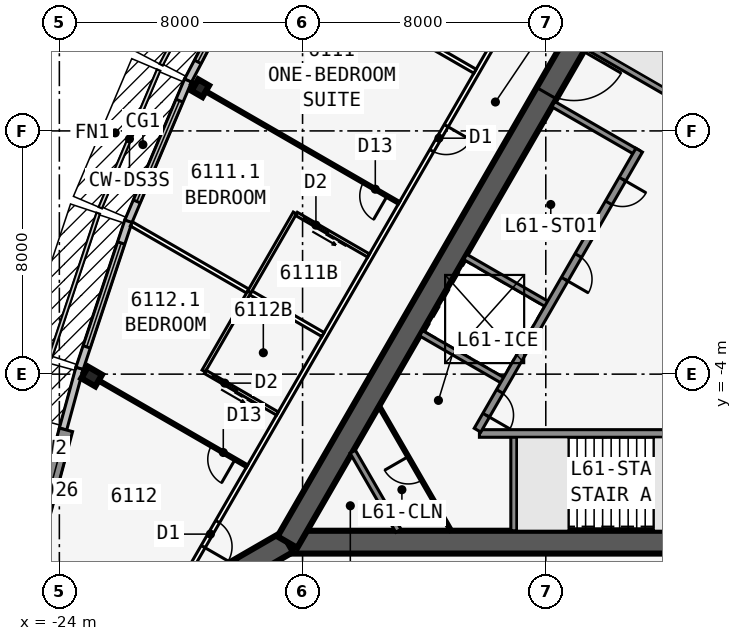
"""IFC4 building model, lengths in metres.
Left out: names, types, materials, properties, quantities, classifications, styles, units other than length and angle.
Written with IfcOpenShell. Run it as: python <this file> out.ifc"""

import sys

from ifc_helpers import new_model, si_unit, direction, frame, frame_2d, origin, origin_2d, place, context, subcontext, project, spatial, polyline, rectangle, i_section, outline, extrude, element, fill, save


model = new_model("IFC4")
c1 = context("Model", 3, precision=1e-05, world=origin(), true_north=direction((0.0, 1.0)))
c2 = subcontext(c1, "Body", "Model", "MODEL_VIEW")
j1 = project(units=[si_unit("LENGTHUNIT", "METRE"), si_unit("PLANEANGLEUNIT", "RADIAN")], contexts=[c1])
p1 = place(None, origin())
s1 = spatial("IfcSite", under=j1, at=p1, CompositionType="ELEMENT")
p2 = place(p1, origin())
s2 = spatial("IfcBuilding", under=s1, at=p2, CompositionType="ELEMENT")
p3 = place(p2, frame((0.0, 0.0, 229.7)))
s3 = spatial("IfcBuildingStorey", under=s2, at=p3, CompositionType="ELEMENT", Elevation=229.7)
p4 = place(p3, frame((-16.5, -9.526, 0.0), z_axis=(0.0, 0.0, 1.0), x_axis=(1.0, 0.0, 0.0)))
e1 = element("IfcWall", 1, at=p4, inside=s3, PredefinedType="SHEAR", context=c2, shape_type="SweptSolid", body=[
    extrude(rectangle(XDim=33.0, YDim=0.75, at=frame_2d((16.5, 0.0))), origin(), (0.0, 0.0, 1.0), 3.6),
])
p5 = place(p4, frame((14.05, 0.0, 0.0)))
e2 = element("IfcOpeningElement", 2, at=p5, cuts=e1, PredefinedType="OPENING", context=c2, shape_type="SweptSolid", body=[
    extrude(rectangle(XDim=1.8, YDim=2.13, at=frame_2d((0.9, 1.065))), frame((0.0, 0.385, 0.0), z_axis=(0.0, -1.0, 0.0), x_axis=(1.0, 0.0, 0.0)), (0.0, 0.0, 1.0), 0.77),
])
p6 = place(p3, frame((-10.183, -5.951, 0.0), z_axis=(0.0, 0.0, 1.0), x_axis=(1.0, 0.0, 0.0)))
e3 = element("IfcWall", 3, at=p6, inside=s3, PredefinedType="SOLIDWALL", context=c2, shape_type="SweptSolid", body=[
    extrude(rectangle(XDim=7.633, YDim=0.25, at=frame_2d((3.816, 0.0))), origin(), (0.0, 0.0, 1.0), 3.35),
])
p7 = place(p3, frame((-9.05, -5.951, 0.0), z_axis=(0.0, 0.0, 1.0), x_axis=(0.0, -1.0, 0.0)))
e4 = element("IfcWall", 4, at=p7, inside=s3, PredefinedType="SOLIDWALL", context=c2, shape_type="SweptSolid", body=[
    extrude(rectangle(XDim=3.2, YDim=0.2, at=frame_2d((1.6, 0.0))), origin(), (0.0, 0.0, 1.0), 3.35),
])
p8 = place(p3, frame((0.0, 19.052, 0.0), z_axis=(0.0, 0.0, 1.0), x_axis=(-0.499999749417, -0.866025548458, 0.0)))
e5 = element("IfcWall", 5, at=p8, inside=s3, PredefinedType="SHEAR", context=c2, shape_type="SweptSolid", body=[
    extrude(rectangle(XDim=33.0, YDim=0.75, at=frame_2d((16.5, 0.0))), origin(), (0.0, 0.0, 1.0), 3.6),
])
p9 = place(p8, frame((14.15, 0.0, 0.0)))
e6 = element("IfcOpeningElement", 6, at=p9, cuts=e5, PredefinedType="OPENING", context=c2, shape_type="SweptSolid", body=[
    extrude(rectangle(XDim=1.8, YDim=2.13, at=frame_2d((0.9, 1.065))), frame((0.0, 0.385, 0.0), z_axis=(0.0, -1.0, 0.0), x_axis=(1.0, 0.0, 0.0)), (0.0, 0.0, 1.0), 0.77),
])
p10 = place(p8, frame((12.6, 0.0, 0.0)))
e7 = element("IfcOpeningElement", 7, at=p10, cuts=e5, PredefinedType="OPENING", context=c2, shape_type="SweptSolid", body=[
    extrude(rectangle(XDim=1.0, YDim=2.13, at=frame_2d((0.5, 1.065))), frame((0.0, 0.385, 0.0), z_axis=(0.0, -1.0, 0.0), x_axis=(1.0, 0.0, 0.0)), (0.0, 0.0, 1.0), 0.77),
])
p11 = place(p3, frame((-4.929, 3.365, 0.0), z_axis=(0.0, 0.0, 1.0), x_axis=(-0.499991433582, -0.866030349552, 0.0)))
e8 = element("IfcWall", 8, at=p11, inside=s3, PredefinedType="SOLIDWALL", context=c2, shape_type="SweptSolid", body=[
    extrude(rectangle(XDim=10.633, YDim=0.25, at=frame_2d((5.316, 0.0))), origin(), (0.0, 0.0, 1.0), 3.35),
])
p12 = place(p11, frame((9.164, 0.0, 0.0)))
e9 = element("IfcOpeningElement", 9, at=p12, cuts=e8, PredefinedType="OPENING", context=c2, shape_type="SweptSolid", body=[
    extrude(rectangle(XDim=0.9, YDim=2.13, at=frame_2d((0.45, 1.065))), frame((0.0, 0.135, 0.0), z_axis=(0.0, -1.0, 0.0), x_axis=(1.0, 0.0, 0.0)), (0.0, 0.0, 1.0), 0.27),
])
p13 = place(p11, frame((1.1, 0.0, 0.0)))
e10 = element("IfcOpeningElement", 10, at=p13, cuts=e8, PredefinedType="OPENING", context=c2, shape_type="SweptSolid", body=[
    extrude(rectangle(XDim=0.9, YDim=2.13, at=frame_2d((0.45, 1.065))), frame((0.0, 0.135, 0.0), z_axis=(0.0, -1.0, 0.0), x_axis=(1.0, 0.0, 0.0)), (0.0, 0.0, 1.0), 0.27),
])
p14 = place(p11, frame((4.0, 0.0, 0.0)))
e11 = element("IfcOpeningElement", 11, at=p14, cuts=e8, PredefinedType="OPENING", context=c2, shape_type="SweptSolid", body=[
    extrude(rectangle(XDim=0.9, YDim=2.13, at=frame_2d((0.45, 1.065))), frame((0.0, 0.135, 0.0), z_axis=(0.0, -1.0, 0.0), x_axis=(1.0, 0.0, 0.0)), (0.0, 0.0, 1.0), 0.27),
])
for number, where, z_axis, x_axis in (
    (12, (-3.879, 5.184, 0.0), (0.0, 0.0, 1.0), (-0.866, 0.5, 0.0)),
    (13, (-4.979, 3.279, 0.0), (0.0, 0.0, 1.0), (-0.866, 0.5, 0.0)),
    (14, (-7.879, -1.744, 0.0), (0.0, 0.0, 1.0), (-0.866, 0.5, 0.0)),
):
    element("IfcWall", number, at=place(p3, frame(where, z_axis=z_axis, x_axis=x_axis)), inside=s3, PredefinedType="SOLIDWALL", context=c2, shape_type="SweptSolid", body=[
        extrude(rectangle(XDim=3.2, YDim=0.2, at=frame_2d((1.6, 0.0))), origin(), (0.0, 0.0, 1.0), 3.35),
    ])
p15 = place(p3, frame((-9.329, -4.256, 0.0), z_axis=(0.0, 0.0, 1.0), x_axis=(-0.866022944154, 0.50000426018, 0.0)))
e15 = element("IfcWall", 15, at=p15, inside=s3, PredefinedType="SOLIDWALL", context=c2, shape_type="SweptSolid", body=[
    extrude(rectangle(XDim=3.2, YDim=0.2, at=frame_2d((1.6, 0.0))), origin(), (0.0, 0.0, 1.0), 3.35),
])
p16 = place(p3, frame((-16.5, -9.526, 0.0), z_axis=(0.0, 0.0, 1.0), x_axis=(-0.866031398331, -0.499989616998, 0.0)))
e16 = element("IfcWall", 16, at=p16, inside=s3, PredefinedType="SHEAR", context=c2, shape_type="SweptSolid", body=[
    extrude(rectangle(XDim=4.746, YDim=0.75, at=frame_2d((2.373, 0.0))), origin(), (0.0, 0.0, 1.0), 3.6),
])
p17 = place(p16, frame((1.725, 0.0, 0.0)))
e17 = element("IfcOpeningElement", 17, at=p17, cuts=e16, PredefinedType="OPENING", context=c2, shape_type="SweptSolid", body=[
    extrude(rectangle(XDim=1.8, YDim=2.13, at=frame_2d((0.9, 1.065))), frame((0.0, 0.385, 0.0), z_axis=(0.0, -1.0, 0.0), x_axis=(1.0, 0.0, 0.0)), (0.0, 0.0, 1.0), 0.77),
])
p18 = place(p3, frame((-19.363, 5.406, 0.0), z_axis=(0.0, 0.0, 1.0), x_axis=(-0.866025403784, 0.5, 0.0)))
e18 = element("IfcColumn", 18, at=p18, inside=s3, PredefinedType="COLUMN", context=c2, shape_type="SweptSolid", body=[
    extrude(i_section(OverallWidth=0.411, OverallDepth=0.434, WebThickness=0.036, FlangeThickness=0.057, at=origin_2d()), origin(), (0.0, 0.0, 1.0), 3.6),
])
p19 = place(p3, frame((-22.937, -4.078, 0.0), z_axis=(0.0, 0.0, 1.0), x_axis=(-0.5, -0.866025403784, 0.0)))
e19 = element("IfcColumn", 19, at=p19, inside=s3, PredefinedType="COLUMN", context=c2, shape_type="SweptSolid", body=[
    extrude(i_section(OverallWidth=0.442, OverallDepth=0.531, WebThickness=0.066, FlangeThickness=0.106, at=origin_2d()), origin(), (0.0, 0.0, 1.0), 3.6),
])
p20 = place(p3, frame((-17.45, 10.081, 0.0), z_axis=(0.0, 0.0, 1.0), x_axis=(-0.463976002579, -0.885847768542, 0.0)))
e20 = element("IfcWall", 20, at=p20, inside=s3, PredefinedType="STANDARD", context=c2, shape_type="SweptSolid", body=[
    extrude(rectangle(XDim=5.004, YDim=0.25, at=frame_2d((2.502, 0.0))), origin(), (0.0, 0.0, 1.0), 3.35),
])
p21 = place(p20, frame((0.702, 0.0, 0.45)))
e21 = element("IfcOpeningElement", 21, at=p21, cuts=e20, PredefinedType="OPENING", context=c2, shape_type="SweptSolid", body=[
    extrude(rectangle(XDim=3.6, YDim=2.6, at=frame_2d((1.8, 1.3))), frame((0.0, 0.135, 0.0), z_axis=(0.0, -1.0, 0.0), x_axis=(1.0, 0.0, 0.0)), (0.0, 0.0, 1.0), 0.27),
])
p22 = place(p3, frame((-19.768, 5.657, 0.0), z_axis=(0.0, 0.0, 1.0), x_axis=(-0.390096809471, -0.920773848044, 0.0)))
e22 = element("IfcWall", 22, at=p22, inside=s3, PredefinedType="STANDARD", context=c2, shape_type="SweptSolid", body=[
    extrude(rectangle(XDim=5.038, YDim=0.25, at=frame_2d((2.519, 0.0))), origin(), (0.0, 0.0, 1.0), 3.35),
])
p23 = place(p22, frame((0.719, 0.0, 0.45)))
e23 = element("IfcOpeningElement", 23, at=p23, cuts=e22, PredefinedType="OPENING", context=c2, shape_type="SweptSolid", body=[
    extrude(rectangle(XDim=3.6, YDim=2.6, at=frame_2d((1.8, 1.3))), frame((0.0, 0.135, 0.0), z_axis=(0.0, -1.0, 0.0), x_axis=(1.0, 0.0, 0.0)), (0.0, 0.0, 1.0), 0.27),
])
p24 = place(p3, frame((-21.729, 1.028, 0.0), z_axis=(0.0, 0.0, 1.0), x_axis=(-0.315108478109, -0.949055660656, 0.0)))
e24 = element("IfcWall", 24, at=p24, inside=s3, PredefinedType="STANDARD", context=c2, shape_type="SweptSolid", body=[
    extrude(rectangle(XDim=5.105, YDim=0.25, at=frame_2d((2.552, 0.0))), origin(), (0.0, 0.0, 1.0), 3.35),
])
p25 = place(p24, frame((0.752, 0.0, 0.45)))
e25 = element("IfcOpeningElement", 25, at=p25, cuts=e24, PredefinedType="OPENING", context=c2, shape_type="SweptSolid", body=[
    extrude(rectangle(XDim=3.6, YDim=2.6, at=frame_2d((1.8, 1.3))), frame((0.0, 0.135, 0.0), z_axis=(0.0, -1.0, 0.0), x_axis=(1.0, 0.0, 0.0)), (0.0, 0.0, 1.0), 0.27),
])
p26 = place(p3, frame((-23.336, -3.811, 0.0), z_axis=(0.0, 0.0, 1.0), x_axis=(-0.262867703986, -0.964831887015, 0.0)))
e26 = element("IfcWall", 26, at=p26, inside=s3, PredefinedType="STANDARD", context=c2, shape_type="SweptSolid", body=[
    extrude(rectangle(XDim=2.068, YDim=0.25, at=frame_2d((1.034, 0.0))), origin(), (0.0, 0.0, 1.0), 3.35),
])
p27 = place(p3, frame((-23.783, -5.832, 0.0), z_axis=(0.0, 0.0, 1.0), x_axis=(-0.258784695888, -0.965935029479, 0.0)))
e27 = element("IfcWall", 27, at=p27, inside=s3, PredefinedType="SOLIDWALL", context=c2, shape_type="SweptSolid", body=[
    extrude(rectangle(XDim=4.184, YDim=0.45, at=frame_2d((2.092, 0.0))), origin(), (0.0, 0.0, 1.0), 3.35),
])
p28 = place(p27, frame((0.592, 0.0, 0.45)))
e28 = element("IfcOpeningElement", 28, at=p28, cuts=e27, PredefinedType="OPENING", context=c2, shape_type="SweptSolid", body=[
    extrude(rectangle(XDim=3.0, YDim=2.6, at=frame_2d((1.5, 1.3))), frame((0.0, 0.235, 0.0), z_axis=(0.0, -1.0, 0.0), x_axis=(1.0, 0.0, 0.0)), (0.0, 0.0, 1.0), 0.47),
])
p29 = place(p3, frame((-24.865, -9.757, 0.0), z_axis=(0.0, 0.0, 1.0), x_axis=(0.258799282522, -0.96593112144, 0.0)))
e29 = element("IfcWall", 29, at=p29, inside=s3, PredefinedType="SOLIDWALL", context=c2, shape_type="SweptSolid", body=[
    extrude(outline(polyline([(4.184, 0.225), (4.125, 0.225), (3.705, 0.113), (3.675, 0.225), (0.0, 0.225), (0.0, -0.225), (4.184, -0.225), (4.184, 0.225)])), origin(), (0.0, 0.0, 1.0), 3.35),
])
p30 = place(p29, frame((0.713, 0.0, 0.45)))
e30 = element("IfcOpeningElement", 30, at=p30, cuts=e29, PredefinedType="OPENING", context=c2, shape_type="SweptSolid", body=[
    extrude(rectangle(XDim=2.4, YDim=2.6, at=frame_2d((1.2, 1.3))), frame((0.0, 0.235, 0.0), z_axis=(0.0, -1.0, 0.0), x_axis=(1.0, 0.0, 0.0)), (0.0, 0.0, 1.0), 0.47),
])
p31 = place(p3, frame((-0.425, 22.966, 0.0), z_axis=(0.0, 0.0, 1.0), x_axis=(-0.500000265775, -0.866025250339, 0.0)))
e31 = element("IfcWall", 31, at=p31, inside=s3, PredefinedType="PARTITIONING", context=c2, shape_type="SweptSolid", body=[
    extrude(rectangle(XDim=39.354, YDim=0.15, at=frame_2d((19.677, 0.0))), origin(), (0.0, 0.0, 1.0), 3.35),
])
p32 = place(p31, frame((1.665, 0.0, 0.0)))
e32 = element("IfcOpeningElement", 32, at=p32, cuts=e31, PredefinedType="OPENING", context=c2, shape_type="SweptSolid", body=[
    extrude(rectangle(XDim=0.95, YDim=2.13, at=frame_2d((0.475, 1.065))), frame((0.0, 0.085, 0.0), z_axis=(0.0, -1.0, 0.0), x_axis=(1.0, 0.0, 0.0)), (0.0, 0.0, 1.0), 0.17),
])
p33 = place(p31, frame((11.702, 0.0, 0.0)))
e33 = element("IfcOpeningElement", 33, at=p33, cuts=e31, PredefinedType="OPENING", context=c2, shape_type="SweptSolid", body=[
    extrude(rectangle(XDim=0.95, YDim=2.13, at=frame_2d((0.475, 1.065))), frame((0.0, 0.085, 0.0), z_axis=(0.0, -1.0, 0.0), x_axis=(1.0, 0.0, 0.0)), (0.0, 0.0, 1.0), 0.17),
])
p34 = place(p31, frame((21.702, 0.0, 0.0)))
e34 = element("IfcOpeningElement", 34, at=p34, cuts=e31, PredefinedType="OPENING", context=c2, shape_type="SweptSolid", body=[
    extrude(rectangle(XDim=0.95, YDim=2.13, at=frame_2d((0.475, 1.065))), frame((0.0, 0.085, 0.0), z_axis=(0.0, -1.0, 0.0), x_axis=(1.0, 0.0, 0.0)), (0.0, 0.0, 1.0), 0.17),
])
p35 = place(p31, frame((36.739, 0.0, 0.0)))
e35 = element("IfcOpeningElement", 35, at=p35, cuts=e31, PredefinedType="OPENING", context=c2, shape_type="SweptSolid", body=[
    extrude(rectangle(XDim=0.95, YDim=2.13, at=frame_2d((0.475, 1.065))), frame((0.0, 0.085, 0.0), z_axis=(0.0, -1.0, 0.0), x_axis=(1.0, 0.0, 0.0)), (0.0, 0.0, 1.0), 0.17),
])
p36 = place(p3, frame((-10.329, 5.963, 0.0), z_axis=(0.0, 0.0, 1.0), x_axis=(-0.866016460812, 0.500015489362, 0.0)))
e36 = element("IfcWall", 36, at=p36, inside=s3, PredefinedType="PARTITIONING", context=c2, shape_type="SweptSolid", body=[
    extrude(rectangle(XDim=8.101, YDim=0.15, at=frame_2d((4.051, 0.0))), origin(), (0.0, 0.0, 1.0), 2.309),
])
p37 = place(p3, frame((-12.829, 1.633, 0.0), z_axis=(0.0, 0.0, 1.0), x_axis=(-0.866030558329, 0.49999107196, 0.0)))
e37 = element("IfcWall", 37, at=p37, inside=s3, PredefinedType="PARTITIONING", context=c2, shape_type="SweptSolid", body=[
    extrude(rectangle(XDim=7.894, YDim=0.1, at=frame_2d((3.947, 0.0))), origin(), (0.0, 0.0, 1.0), 2.25),
])
p38 = place(p37, frame((0.45, 0.0, 0.0)))
e38 = element("IfcOpeningElement", 38, at=p38, cuts=e37, PredefinedType="OPENING", context=c2, shape_type="SweptSolid", body=[
    extrude(rectangle(XDim=0.9, YDim=2.13, at=frame_2d((0.45, 1.065))), frame((0.0, 0.06, 0.0), z_axis=(0.0, -1.0, 0.0), x_axis=(1.0, 0.0, 0.0)), (0.0, 0.0, 1.0), 0.12),
])
p39 = place(p3, frame((-15.329, -2.697, 0.0), z_axis=(0.0, 0.0, 1.0), x_axis=(-0.866032413668, 0.499987858329, 0.0)))
e39 = element("IfcWall", 39, at=p39, inside=s3, PredefinedType="PARTITIONING", context=c2, shape_type="SweptSolid", body=[
    extrude(rectangle(XDim=7.273, YDim=0.15, at=frame_2d((3.636, 0.0))), origin(), (0.0, 0.0, 1.0), 2.309),
])
p40 = place(p3, frame((-17.829, -7.027, 0.0), z_axis=(0.0, 0.0, 1.0), x_axis=(-0.866026604282, 0.499997920671, 0.0)))
e40 = element("IfcWall", 40, at=p40, inside=s3, PredefinedType="PARTITIONING", context=c2, shape_type="SweptSolid", body=[
    extrude(rectangle(XDim=6.24, YDim=0.1, at=frame_2d((3.12, 0.0))), origin(), (0.0, 0.0, 1.0), 2.25),
])
p41 = place(p40, frame((0.45, 0.0, 0.0)))
e41 = element("IfcOpeningElement", 41, at=p41, cuts=e40, PredefinedType="OPENING", context=c2, shape_type="SweptSolid", body=[
    extrude(rectangle(XDim=0.9, YDim=2.13, at=frame_2d((0.45, 1.065))), frame((0.0, 0.06, 0.0), z_axis=(0.0, -1.0, 0.0), x_axis=(1.0, 0.0, 0.0)), (0.0, 0.0, 1.0), 0.12),
])
p42 = place(p3, frame((-16.253, 1.301, 0.0), z_axis=(0.0, 0.0, 1.0), x_axis=(-0.499990139034, -0.866031096941, 0.0)))
e42 = element("IfcWall", 42, at=p42, inside=s3, PredefinedType="PLUMBINGWALL", context=c2, shape_type="SweptSolid", body=[
    extrude(rectangle(XDim=3.0, YDim=0.12, at=frame_2d((1.5, 0.0))), origin(), (0.0, 0.0, 1.0), 3.35),
])
p43 = place(p3, frame((-13.829, -0.099, 0.0), z_axis=(0.0, 0.0, 1.0), x_axis=(-0.865997131366, 0.500048966069, 0.0)))
e43 = element("IfcWall", 43, at=p43, inside=s3, PredefinedType="PLUMBINGWALL", context=c2, shape_type="SweptSolid", body=[
    extrude(rectangle(XDim=2.74, YDim=0.12, at=frame_2d((1.37, 0.0))), origin(), (0.0, 0.0, 1.0), 3.35),
])
p44 = place(p43, frame((1.55, 0.0, 0.0)))
e44 = element("IfcOpeningElement", 44, at=p44, cuts=e43, PredefinedType="OPENING", context=c2, shape_type="SweptSolid", body=[
    extrude(rectangle(XDim=0.9, YDim=2.13, at=frame_2d((0.45, 1.065))), frame((0.0, 0.07, 0.0), z_axis=(0.0, -1.0, 0.0), x_axis=(1.0, 0.0, 0.0)), (0.0, 0.0, 1.0), 0.14),
])
p45 = place(p3, frame((-17.753, -1.297, 0.0), z_axis=(0.0, 0.0, 1.0), x_axis=(-0.499990139034, -0.866031096941, 0.0)))
e45 = element("IfcWall", 45, at=p45, inside=s3, PredefinedType="PLUMBINGWALL", context=c2, shape_type="SweptSolid", body=[
    extrude(rectangle(XDim=3.0, YDim=0.12, at=frame_2d((1.5, 0.0))), origin(), (0.0, 0.0, 1.0), 3.35),
])
p46 = place(p3, frame((-16.829, -5.295, 0.0), z_axis=(0.0, 0.0, 1.0), x_axis=(-0.866035715982, 0.499982138324, 0.0)))
e46 = element("IfcWall", 46, at=p46, inside=s3, PredefinedType="PLUMBINGWALL", context=c2, shape_type="SweptSolid", body=[
    extrude(rectangle(XDim=2.74, YDim=0.12, at=frame_2d((1.37, 0.0))), origin(), (0.0, 0.0, 1.0), 3.35),
])
p47 = place(p46, frame((1.55, 0.0, 0.0)))
e47 = element("IfcOpeningElement", 47, at=p47, cuts=e46, PredefinedType="OPENING", context=c2, shape_type="SweptSolid", body=[
    extrude(rectangle(XDim=0.9, YDim=2.13, at=frame_2d((0.45, 1.065))), frame((0.0, 0.07, 0.0), z_axis=(0.0, -1.0, 0.0), x_axis=(1.0, 0.0, 0.0)), (0.0, 0.0, 1.0), 0.14),
])
p48 = place(p3, frame((-12.848, -9.151, 0.0), z_axis=(0.0, 0.0, 1.0), x_axis=(-0.499952404951, 0.866052881055, 0.0)))
e48 = element("IfcWall", 48, at=p48, inside=s3, PredefinedType="SOLIDWALL", context=c2, shape_type="SweptSolid", body=[
    extrude(rectangle(XDim=3.002, YDim=0.2, at=frame_2d((1.501, 0.0))), origin(), (0.0, 0.0, 1.0), 3.35),
])
p49 = place(p3, frame((-11.116, -9.151, 0.0), z_axis=(0.0, 0.0, 1.0), x_axis=(-0.499999210213, 0.866025859768, 0.0)))
e49 = element("IfcWall", 49, at=p49, inside=s3, PredefinedType="PARTITIONING", context=c2, shape_type="SweptSolid", body=[
    extrude(rectangle(XDim=4.734, YDim=0.1, at=frame_2d((2.367, 0.0))), origin(), (0.0, 0.0, 1.0), 3.35),
])
p50 = place(p49, frame((1.917, 0.0, 0.0)))
e50 = element("IfcOpeningElement", 50, at=p50, cuts=e49, PredefinedType="OPENING", context=c2, shape_type="SweptSolid", body=[
    extrude(rectangle(XDim=0.9, YDim=2.13, at=frame_2d((0.45, 1.065))), frame((0.0, 0.06, 0.0), z_axis=(0.0, -1.0, 0.0), x_axis=(1.0, 0.0, 0.0)), (0.0, 0.0, 1.0), 0.12),
])
p51 = place(p3, frame((-7.247, -7.576, 0.0), z_axis=(0.0, 0.0, 1.0), x_axis=(1.0, 0.0, 0.0)))
e51 = element("IfcWall", 51, at=p51, inside=s3, PredefinedType="SOLIDWALL", context=c2, shape_type="SweptSolid", body=[
    extrude(rectangle(XDim=2.794, YDim=0.1, at=frame_2d((1.397, 0.0))), origin(), (0.0, 0.0, 1.0), 3.6),
])
p52 = place(p21, origin())
e52 = element("IfcWindow", 52, at=p52, inside=s3, PartitioningType="SINGLE_PANEL", PredefinedType="WINDOW", context=c2, shape_type="SweptSolid", body=[
    extrude(rectangle(XDim=3.6, YDim=2.6, at=frame_2d((1.8, 1.3))), frame((0.0, 0.03, 0.0), z_axis=(0.0, -1.0, 0.0), x_axis=(1.0, 0.0, 0.0)), (0.0, 0.0, 1.0), 0.06),
])
fill(e21, e52)
p53 = place(p23, origin())
e53 = element("IfcWindow", 53, at=p53, inside=s3, PartitioningType="SINGLE_PANEL", PredefinedType="WINDOW", context=c2, shape_type="SweptSolid", body=[
    extrude(rectangle(XDim=3.6, YDim=2.6, at=frame_2d((1.8, 1.3))), frame((0.0, 0.03, 0.0), z_axis=(0.0, -1.0, 0.0), x_axis=(1.0, 0.0, 0.0)), (0.0, 0.0, 1.0), 0.06),
])
fill(e23, e53)
p54 = place(p25, origin())
e54 = element("IfcWindow", 54, at=p54, inside=s3, PartitioningType="SINGLE_PANEL", PredefinedType="WINDOW", context=c2, shape_type="SweptSolid", body=[
    extrude(rectangle(XDim=3.6, YDim=2.6, at=frame_2d((1.8, 1.3))), frame((0.0, 0.03, 0.0), z_axis=(0.0, -1.0, 0.0), x_axis=(1.0, 0.0, 0.0)), (0.0, 0.0, 1.0), 0.06),
])
fill(e25, e54)
p55 = place(p28, origin())
e55 = element("IfcWindow", 55, at=p55, inside=s3, PartitioningType="SINGLE_PANEL", PredefinedType="WINDOW", context=c2, shape_type="SweptSolid", body=[
    extrude(rectangle(XDim=3.0, YDim=2.6, at=frame_2d((1.5, 1.3))), frame((0.0, 0.03, 0.0), z_axis=(0.0, -1.0, 0.0), x_axis=(1.0, 0.0, 0.0)), (0.0, 0.0, 1.0), 0.06),
])
fill(e28, e55)
p56 = place(p38, origin())
e56 = element("IfcDoor", 56, at=p56, inside=s3, OperationType="SINGLE_SWING_LEFT", PredefinedType="DOOR", context=c2, shape_type="SweptSolid", body=[
    extrude(rectangle(XDim=0.9, YDim=2.13, at=frame_2d((0.45, 1.065))), frame((0.0, 0.025, 0.0), z_axis=(0.0, -1.0, 0.0), x_axis=(1.0, 0.0, 0.0)), (0.0, 0.0, 1.0), 0.05),
])
fill(e38, e56)
p57 = place(p41, origin())
e57 = element("IfcDoor", 57, at=p57, inside=s3, OperationType="SINGLE_SWING_LEFT", PredefinedType="DOOR", context=c2, shape_type="SweptSolid", body=[
    extrude(rectangle(XDim=0.9, YDim=2.13, at=frame_2d((0.45, 1.065))), frame((0.0, 0.025, 0.0), z_axis=(0.0, -1.0, 0.0), x_axis=(1.0, 0.0, 0.0)), (0.0, 0.0, 1.0), 0.05),
])
fill(e41, e57)
p58 = place(p34, origin())
e58 = element("IfcDoor", 58, at=p58, inside=s3, OperationType="SINGLE_SWING_LEFT", PredefinedType="DOOR", context=c2, shape_type="SweptSolid", body=[
    extrude(rectangle(XDim=0.95, YDim=2.13, at=frame_2d((0.475, 1.065))), frame((0.0, 0.025, 0.0), z_axis=(0.0, -1.0, 0.0), x_axis=(1.0, 0.0, 0.0)), (0.0, 0.0, 1.0), 0.05),
])
fill(e34, e58)
p59 = place(p44, origin())
e59 = element("IfcDoor", 59, at=p59, inside=s3, OperationType="SLIDING_TO_LEFT", PredefinedType="DOOR", context=c2, shape_type="SweptSolid", body=[
    extrude(rectangle(XDim=0.9, YDim=2.13, at=frame_2d((0.45, 1.065))), frame((0.0, 0.025, 0.0), z_axis=(0.0, -1.0, 0.0), x_axis=(1.0, 0.0, 0.0)), (0.0, 0.0, 1.0), 0.05),
])
fill(e44, e59)
p60 = place(p47, origin())
e60 = element("IfcDoor", 60, at=p60, inside=s3, OperationType="SLIDING_TO_LEFT", PredefinedType="DOOR", context=c2, shape_type="SweptSolid", body=[
    extrude(rectangle(XDim=0.9, YDim=2.13, at=frame_2d((0.45, 1.065))), frame((0.0, 0.025, 0.0), z_axis=(0.0, -1.0, 0.0), x_axis=(1.0, 0.0, 0.0)), (0.0, 0.0, 1.0), 0.05),
])
fill(e47, e60)
p61 = place(p35, origin())
e61 = element("IfcDoor", 61, at=p61, inside=s3, OperationType="SINGLE_SWING_RIGHT", PredefinedType="DOOR", context=c2, shape_type="SweptSolid", body=[
    extrude(rectangle(XDim=0.95, YDim=2.13, at=frame_2d((0.475, 1.065))), frame((0.0, 0.025, 0.0), z_axis=(0.0, -1.0, 0.0), x_axis=(1.0, 0.0, 0.0)), (0.0, 0.0, 1.0), 0.05),
])
fill(e35, e61)
p62 = place(p9, origin())
e62 = element("IfcDoor", 62, at=p62, inside=s3, OperationType="DOUBLE_DOOR_SINGLE_SWING", PredefinedType="DOOR", context=c2, shape_type="SweptSolid", body=[
    extrude(rectangle(XDim=1.8, YDim=2.13, at=frame_2d((0.9, 1.065))), frame((0.0, 0.025, 0.0), z_axis=(0.0, -1.0, 0.0), x_axis=(1.0, 0.0, 0.0)), (0.0, 0.0, 1.0), 0.05),
])
fill(e6, e62)
p63 = place(p50, origin())
e63 = element("IfcDoor", 63, at=p63, inside=s3, OperationType="SINGLE_SWING_RIGHT", PredefinedType="DOOR", context=c2, shape_type="SweptSolid", body=[
    extrude(rectangle(XDim=0.9, YDim=2.13, at=frame_2d((0.45, 1.065))), frame((0.0, 0.025, 0.0), z_axis=(0.0, -1.0, 0.0), x_axis=(1.0, 0.0, 0.0)), (0.0, 0.0, 1.0), 0.05),
])
fill(e50, e63)
p64 = place(p12, origin())
e64 = element("IfcDoor", 64, at=p64, inside=s3, OperationType="SINGLE_SWING_RIGHT", PredefinedType="DOOR", context=c2, shape_type="SweptSolid", body=[
    extrude(rectangle(XDim=0.9, YDim=2.13, at=frame_2d((0.45, 1.065))), frame((0.0, 0.025, 0.0), z_axis=(0.0, -1.0, 0.0), x_axis=(1.0, 0.0, 0.0)), (0.0, 0.0, 1.0), 0.05),
])
fill(e9, e64)
p65 = place(p13, origin())
e65 = element("IfcDoor", 65, at=p65, inside=s3, OperationType="SINGLE_SWING_LEFT", PredefinedType="DOOR", context=c2, shape_type="SweptSolid", body=[
    extrude(rectangle(XDim=0.9, YDim=2.13, at=frame_2d((0.45, 1.065))), frame((0.0, 0.025, 0.0), z_axis=(0.0, -1.0, 0.0), x_axis=(1.0, 0.0, 0.0)), (0.0, 0.0, 1.0), 0.05),
])
fill(e10, e65)
p66 = place(p14, origin())
e66 = element("IfcDoor", 66, at=p66, inside=s3, OperationType="SINGLE_SWING_RIGHT", PredefinedType="DOOR", context=c2, shape_type="SweptSolid", body=[
    extrude(rectangle(XDim=0.9, YDim=2.13, at=frame_2d((0.45, 1.065))), frame((0.0, 0.025, 0.0), z_axis=(0.0, -1.0, 0.0), x_axis=(1.0, 0.0, 0.0)), (0.0, 0.0, 1.0), 0.05),
])
fill(e11, e66)
save(model, sys.argv[1])
